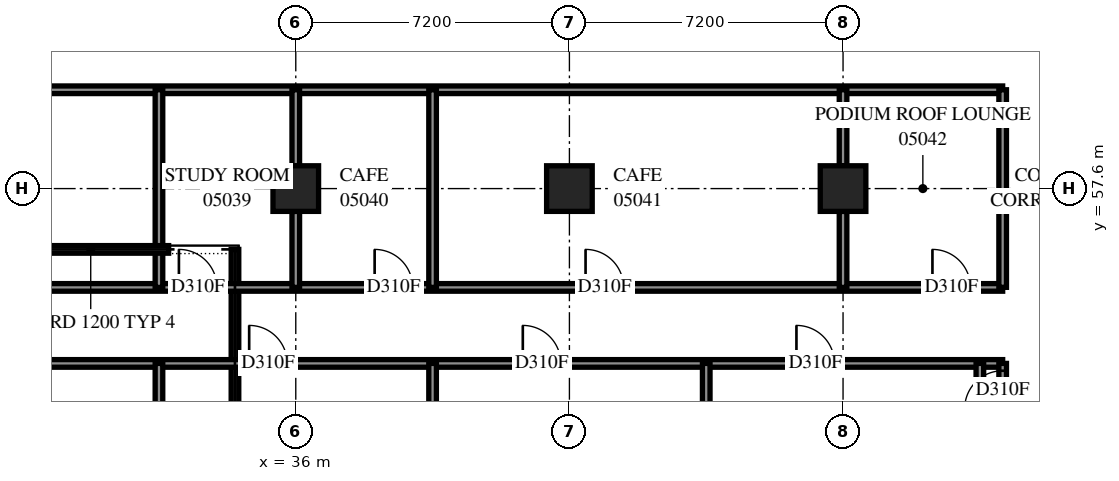
"""IFC4 building model, lengths in metres.
Left out: names, types, materials, properties, quantities, classifications, styles, units other than length and angle.
Written with IfcOpenShell. Run it as: python <this file> out.ifc"""

import sys

from ifc_helpers import new_model, si_unit, direction, frame, frame_2d, origin, origin_2d, place, context, subcontext, project, spatial, polyline, rectangle, outline, extrude, element, fill, save


model = new_model("IFC4")
c1 = context("Model", 3, precision=1e-05, world=origin(), true_north=direction((0.0, 1.0)))
c2 = subcontext(c1, "Body", "Model", "MODEL_VIEW")
j1 = project(units=[si_unit("LENGTHUNIT", "METRE"), si_unit("PLANEANGLEUNIT", "RADIAN")], contexts=[c1])
p1 = place(None, origin())
s1 = spatial("IfcSite", under=j1, at=p1, CompositionType="ELEMENT")
p2 = place(p1, origin())
s2 = spatial("IfcBuilding", under=s1, at=p2, CompositionType="ELEMENT")
p3 = place(p2, frame((0.0, 0.0, 22.8)))
s3 = spatial("IfcBuildingStorey", under=s2, at=p3, CompositionType="ELEMENT", Elevation=22.8)
for number, where, z_axis, x_axis in (
    (1, (36.0, 57.6, 0.0), (0.0, 0.0, 1.0), (1.0, 0.0, 0.0)),
    (2, (43.2, 57.6, 0.0), (0.0, 0.0, 1.0), (1.0, 0.0, 0.0)),
    (3, (50.4, 57.6, 0.0), (0.0, 0.0, 1.0), (1.0, 0.0, 0.0)),
):
    element("IfcColumn", number, at=place(p3, frame(where, z_axis=z_axis, x_axis=x_axis)), inside=s3, PredefinedType="COLUMN", context=c2, shape_type="SweptSolid", body=[
        extrude(rectangle(XDim=1.2, YDim=1.2, at=origin_2d()), origin(), (0.0, 0.0, 1.0), 3.9),
    ])
p4 = place(p3, frame((34.4, 47.9, 0.0), z_axis=(0.0, 0.0, 1.0), x_axis=(0.0, 1.0, 0.0)))
e4 = element("IfcWall", 4, at=p4, inside=s3, PredefinedType="PARAPET", context=c2, shape_type="SweptSolid", body=[
    extrude(outline(polyline([(0.1, -0.1), (8.2, -0.1), (8.0, 0.1), (-0.1, 0.1), (0.1, -0.1)])), origin(), (0.0, 0.0, 1.0), 0.25),
])
p5 = place(p3, frame((0.0, 55.0, 0.0), z_axis=(0.0, 0.0, 1.0), x_axis=(1.0, 0.0, 0.0)))
e5 = element("IfcWall", 5, at=p5, inside=s3, PredefinedType="PARTITIONING", context=c2, shape_type="SweptSolid", body=[
    extrude(rectangle(XDim=54.6, YDim=0.2, at=frame_2d((27.3, 0.0))), origin(), (0.0, 0.0, 1.0), 3.9),
])
p6 = place(p5, frame((8.689, 0.0, 0.0)))
e6 = element("IfcOpeningElement", 6, at=p6, cuts=e5, PredefinedType="OPENING", context=c2, shape_type="SweptSolid", body=[
    extrude(rectangle(XDim=1.0, YDim=2.1, at=frame_2d((0.5, 1.05))), frame((0.0, 0.11, 0.0), z_axis=(0.0, -1.0, 0.0), x_axis=(1.0, 0.0, 0.0)), (0.0, 0.0, 1.0), 0.22),
])
p7 = place(p5, frame((14.825, 0.0, 0.0)))
e7 = element("IfcOpeningElement", 7, at=p7, cuts=e5, PredefinedType="OPENING", context=c2, shape_type="SweptSolid", body=[
    extrude(rectangle(XDim=1.0, YDim=2.1, at=frame_2d((0.5, 1.05))), frame((0.0, 0.11, 0.0), z_axis=(0.0, -1.0, 0.0), x_axis=(1.0, 0.0, 0.0)), (0.0, 0.0, 1.0), 0.22),
])
p8 = place(p5, frame((27.284, 0.0, 0.0)))
e8 = element("IfcOpeningElement", 8, at=p8, cuts=e5, PredefinedType="OPENING", context=c2, shape_type="SweptSolid", body=[
    extrude(rectangle(XDim=1.0, YDim=2.1, at=frame_2d((0.5, 1.05))), frame((0.0, 0.11, 0.0), z_axis=(0.0, -1.0, 0.0), x_axis=(1.0, 0.0, 0.0)), (0.0, 0.0, 1.0), 0.22),
])
p9 = place(p5, frame((32.925, 0.0, 0.0)))
e9 = element("IfcOpeningElement", 9, at=p9, cuts=e5, PredefinedType="OPENING", context=c2, shape_type="SweptSolid", body=[
    extrude(rectangle(XDim=1.0, YDim=2.1, at=frame_2d((0.5, 1.05))), frame((0.0, 0.11, 0.0), z_axis=(0.0, -1.0, 0.0), x_axis=(1.0, 0.0, 0.0)), (0.0, 0.0, 1.0), 0.22),
])
p10 = place(p5, frame((38.075, 0.0, 0.0)))
e10 = element("IfcOpeningElement", 10, at=p10, cuts=e5, PredefinedType="OPENING", context=c2, shape_type="SweptSolid", body=[
    extrude(rectangle(XDim=1.0, YDim=2.1, at=frame_2d((0.5, 1.05))), frame((0.0, 0.11, 0.0), z_axis=(0.0, -1.0, 0.0), x_axis=(1.0, 0.0, 0.0)), (0.0, 0.0, 1.0), 0.22),
])
p11 = place(p5, frame((43.625, 0.0, 0.0)))
e11 = element("IfcOpeningElement", 11, at=p11, cuts=e5, PredefinedType="OPENING", context=c2, shape_type="SweptSolid", body=[
    extrude(rectangle(XDim=1.0, YDim=2.1, at=frame_2d((0.5, 1.05))), frame((0.0, 0.11, 0.0), z_axis=(0.0, -1.0, 0.0), x_axis=(1.0, 0.0, 0.0)), (0.0, 0.0, 1.0), 0.22),
])
p12 = place(p5, frame((52.752, 0.0, 0.0)))
e12 = element("IfcOpeningElement", 12, at=p12, cuts=e5, PredefinedType="OPENING", context=c2, shape_type="SweptSolid", body=[
    extrude(rectangle(XDim=1.0, YDim=2.1, at=frame_2d((0.5, 1.05))), frame((0.0, 0.11, 0.0), z_axis=(0.0, -1.0, 0.0), x_axis=(1.0, 0.0, 0.0)), (0.0, 0.0, 1.0), 0.22),
])
p13 = place(p5, frame((2.332, 0.0, 0.0)))
e13 = element("IfcOpeningElement", 13, at=p13, cuts=e5, PredefinedType="OPENING", context=c2, shape_type="SweptSolid", body=[
    extrude(rectangle(XDim=1.0, YDim=2.1, at=frame_2d((0.5, 1.05))), frame((0.0, 0.11, 0.0), z_axis=(0.0, -1.0, 0.0), x_axis=(1.0, 0.0, 0.0)), (0.0, 0.0, 1.0), 0.22),
])
p14 = place(p3, frame((0.0, 53.0, 0.0), z_axis=(0.0, 0.0, 1.0), x_axis=(1.0, 0.0, 0.0)))
e14 = element("IfcWall", 14, at=p14, inside=s3, PredefinedType="PARTITIONING", context=c2, shape_type="SweptSolid", body=[
    extrude(rectangle(XDim=54.6, YDim=0.2, at=frame_2d((27.3, 0.0))), origin(), (0.0, 0.0, 1.0), 3.9),
])
p15 = place(p14, frame((8.689, 0.0, 0.0)))
e15 = element("IfcOpeningElement", 15, at=p15, cuts=e14, PredefinedType="OPENING", context=c2, shape_type="SweptSolid", body=[
    extrude(rectangle(XDim=1.0, YDim=2.1, at=frame_2d((0.5, 1.05))), frame((0.0, 0.11, 0.0), z_axis=(0.0, -1.0, 0.0), x_axis=(1.0, 0.0, 0.0)), (0.0, 0.0, 1.0), 0.22),
])
p16 = place(p14, frame((13.174, 0.0, 0.0)))
e16 = element("IfcOpeningElement", 16, at=p16, cuts=e14, PredefinedType="OPENING", context=c2, shape_type="SweptSolid", body=[
    extrude(rectangle(XDim=1.0, YDim=2.1, at=frame_2d((0.5, 1.05))), frame((0.0, 0.11, 0.0), z_axis=(0.0, -1.0, 0.0), x_axis=(1.0, 0.0, 0.0)), (0.0, 0.0, 1.0), 0.22),
])
p17 = place(p14, frame((20.374, 0.0, 0.0)))
e17 = element("IfcOpeningElement", 17, at=p17, cuts=e14, PredefinedType="OPENING", context=c2, shape_type="SweptSolid", body=[
    extrude(rectangle(XDim=1.0, YDim=2.1, at=frame_2d((0.5, 1.05))), frame((0.0, 0.11, 0.0), z_axis=(0.0, -1.0, 0.0), x_axis=(1.0, 0.0, 0.0)), (0.0, 0.0, 1.0), 0.22),
])
p18 = place(p14, frame((27.574, 0.0, 0.0)))
e18 = element("IfcOpeningElement", 18, at=p18, cuts=e14, PredefinedType="OPENING", context=c2, shape_type="SweptSolid", body=[
    extrude(rectangle(XDim=1.0, YDim=2.1, at=frame_2d((0.5, 1.05))), frame((0.0, 0.11, 0.0), z_axis=(0.0, -1.0, 0.0), x_axis=(1.0, 0.0, 0.0)), (0.0, 0.0, 1.0), 0.22),
])
p19 = place(p14, frame((34.774, 0.0, 0.0)))
e19 = element("IfcOpeningElement", 19, at=p19, cuts=e14, PredefinedType="OPENING", context=c2, shape_type="SweptSolid", body=[
    extrude(rectangle(XDim=1.0, YDim=2.1, at=frame_2d((0.5, 1.05))), frame((0.0, 0.11, 0.0), z_axis=(0.0, -1.0, 0.0), x_axis=(1.0, 0.0, 0.0)), (0.0, 0.0, 1.0), 0.22),
])
p20 = place(p14, frame((41.974, 0.0, 0.0)))
e20 = element("IfcOpeningElement", 20, at=p20, cuts=e14, PredefinedType="OPENING", context=c2, shape_type="SweptSolid", body=[
    extrude(rectangle(XDim=1.0, YDim=2.1, at=frame_2d((0.5, 1.05))), frame((0.0, 0.11, 0.0), z_axis=(0.0, -1.0, 0.0), x_axis=(1.0, 0.0, 0.0)), (0.0, 0.0, 1.0), 0.22),
])
p21 = place(p14, frame((49.174, 0.0, 0.0)))
e21 = element("IfcOpeningElement", 21, at=p21, cuts=e14, PredefinedType="OPENING", context=c2, shape_type="SweptSolid", body=[
    extrude(rectangle(XDim=1.0, YDim=2.1, at=frame_2d((0.5, 1.05))), frame((0.0, 0.11, 0.0), z_axis=(0.0, -1.0, 0.0), x_axis=(1.0, 0.0, 0.0)), (0.0, 0.0, 1.0), 0.22),
])
p22 = place(p14, frame((2.406, 0.0, 0.0)))
e22 = element("IfcOpeningElement", 22, at=p22, cuts=e14, PredefinedType="OPENING", context=c2, shape_type="SweptSolid", body=[
    extrude(rectangle(XDim=1.0, YDim=2.1, at=frame_2d((0.5, 1.05))), frame((0.0, 0.11, 0.0), z_axis=(0.0, -1.0, 0.0), x_axis=(1.0, 0.0, 0.0)), (0.0, 0.0, 1.0), 0.22),
])
p23 = place(p14, frame((4.748, 0.0, 0.0)))
e23 = element("IfcOpeningElement", 23, at=p23, cuts=e14, PredefinedType="OPENING", context=c2, shape_type="SweptSolid", body=[
    extrude(rectangle(XDim=1.0, YDim=2.1, at=frame_2d((0.5, 1.05))), frame((0.0, 0.11, 0.0), z_axis=(0.0, -1.0, 0.0), x_axis=(1.0, 0.0, 0.0)), (0.0, 0.0, 1.0), 0.22),
])
p24 = place(p3, frame((0.002, 60.2, 0.0), z_axis=(0.0, 0.0, 1.0), x_axis=(1.0, 0.0, 0.0)))
e24 = element("IfcWall", 24, at=p24, inside=s3, PredefinedType="PARTITIONING", context=c2, shape_type="SweptSolid", body=[
    extrude(rectangle(XDim=54.598, YDim=0.2, at=frame_2d((27.299, 0.0))), origin(), (0.0, 0.0, 1.0), 3.9),
])
p25 = place(p24, frame((3.863, 0.0, 0.0)))
e25 = element("IfcOpeningElement", 25, at=p25, cuts=e24, PredefinedType="OPENING", context=c2, shape_type="SweptSolid", body=[
    extrude(rectangle(XDim=1.0, YDim=2.1, at=frame_2d((0.5, 1.05))), frame((0.0, 0.11, 0.0), z_axis=(0.0, -1.0, 0.0), x_axis=(1.0, 0.0, 0.0)), (0.0, 0.0, 1.0), 0.22),
])
for number, where, z_axis, x_axis in (
    (26, (32.4, 42.55, 0.0), (0.0, 0.0, 1.0), (0.0, 1.0, 0.0)),
    (27, (39.6, 42.55, 0.0), (0.0, 0.0, 1.0), (0.0, 1.0, 0.0)),
    (28, (46.8, 42.55, 0.0), (0.0, 0.0, 1.0), (0.0, 1.0, 0.0)),
    (29, (54.0, 42.55, 0.0), (0.0, 0.0, 1.0), (0.0, 1.0, 0.0)),
):
    element("IfcWall", number, at=place(p3, frame(where, z_axis=z_axis, x_axis=x_axis)), inside=s3, PredefinedType="PARTITIONING", context=c2, shape_type="SweptSolid", body=[
        extrude(rectangle(XDim=10.45, YDim=0.2, at=frame_2d((5.225, 0.0))), origin(), (0.0, 0.0, 1.0), 3.9),
    ])
p26 = place(p3, frame((54.6, 47.4, 0.0), z_axis=(0.0, 0.0, 1.0), x_axis=(0.0, 1.0, 0.0)))
e30 = element("IfcWall", 30, at=p26, inside=s3, PredefinedType="PARTITIONING", context=c2, shape_type="SweptSolid", body=[
    extrude(rectangle(XDim=5.6, YDim=0.2, at=frame_2d((2.8, 0.0))), origin(), (0.0, 0.0, 1.0), 3.9),
])
p27 = place(p26, frame((4.407, 0.0, 0.0)))
e31 = element("IfcOpeningElement", 31, at=p27, cuts=e30, PredefinedType="OPENING", context=c2, shape_type="SweptSolid", body=[
    extrude(rectangle(XDim=1.0, YDim=2.1, at=frame_2d((0.5, 1.05))), frame((0.0, 0.11, 0.0), z_axis=(0.0, -1.0, 0.0), x_axis=(1.0, 0.0, 0.0)), (0.0, 0.0, 1.0), 0.22),
])
for number, where, z_axis, x_axis in (
    (32, (32.4, 55.0, 0.0), (0.0, 0.0, 1.0), (0.0, 1.0, 0.0)),
    (33, (39.6, 55.0, 0.0), (0.0, 0.0, 1.0), (0.0, 1.0, 0.0)),
):
    element("IfcWall", number, at=place(p3, frame(where, z_axis=z_axis, x_axis=x_axis)), inside=s3, PredefinedType="PARTITIONING", context=c2, shape_type="SweptSolid", body=[
        extrude(rectangle(XDim=5.2, YDim=0.2, at=frame_2d((2.6, 0.0))), origin(), (0.0, 0.0, 1.0), 3.9),
    ])
p28 = place(p3, frame((54.6, 55.002, 0.0), z_axis=(0.0, 0.0, 1.0), x_axis=(0.0, 1.0, 0.0)))
e34 = element("IfcWall", 34, at=p28, inside=s3, PredefinedType="PARTITIONING", context=c2, shape_type="SweptSolid", body=[
    extrude(rectangle(XDim=5.198, YDim=0.2, at=frame_2d((2.599, 0.0))), origin(), (0.0, 0.0, 1.0), 3.9),
])
p29 = place(p3, frame((36.0, 55.0, 0.0), z_axis=(0.0, 0.0, 1.0), x_axis=(0.0, 1.0, 0.0)))
e35 = element("IfcWall", 35, at=p29, inside=s3, PredefinedType="PARTITIONING", context=c2, shape_type="SweptSolid", body=[
    extrude(rectangle(XDim=2.0, YDim=0.2, at=frame_2d((1.0, 0.0))), origin(), (0.0, 0.0, 1.0), 3.4),
])
for number, where, z_axis, x_axis in (
    (36, (36.0, 58.2, 0.0), (0.0, 0.0, 1.0), (0.0, 1.0, 0.0)),
    (37, (50.4, 55.0, 0.0), (0.0, 0.0, 1.0), (0.0, 1.0, 0.0)),
    (38, (50.4, 58.2, 0.0), (0.0, 0.0, 1.0), (0.0, 1.0, 0.0)),
):
    element("IfcWall", number, at=place(p3, frame(where, z_axis=z_axis, x_axis=x_axis)), inside=s3, PredefinedType="PARTITIONING", context=c2, shape_type="SweptSolid", body=[
        extrude(rectangle(XDim=2.0, YDim=0.2, at=frame_2d((1.0, 0.0))), origin(), (0.0, 0.0, 1.0), 3.9),
    ])
p30 = place(p3, frame((32.655, 56.0, 0.0), z_axis=(0.0, 0.0, 1.0), x_axis=(-1.0, 0.0, 0.0)))
e39 = element("IfcWall", 39, at=p30, inside=s3, PredefinedType="PARAPET", context=c2, shape_type="SweptSolid", body=[
    extrude(outline(polyline([(0.0, -0.1), (4.101, -0.1), (4.101, 0.1), (0.0, 0.1), (0.0, -0.1)])), origin(), (0.0, 0.0, 1.0), 0.25),
])
p31 = place(p19, origin())
e40 = element("IfcDoor", 40, at=p31, inside=s3, OperationType="SINGLE_SWING_RIGHT", PredefinedType="DOOR", context=c2, shape_type="SweptSolid", body=[
    extrude(rectangle(XDim=1.0, YDim=2.1, at=frame_2d((0.5, 1.05))), frame((0.0, 0.025, 0.0), z_axis=(0.0, -1.0, 0.0), x_axis=(1.0, 0.0, 0.0)), (0.0, 0.0, 1.0), 0.05),
])
fill(e19, e40)
p32 = place(p20, origin())
e41 = element("IfcDoor", 41, at=p32, inside=s3, OperationType="SINGLE_SWING_RIGHT", PredefinedType="DOOR", context=c2, shape_type="SweptSolid", body=[
    extrude(rectangle(XDim=1.0, YDim=2.1, at=frame_2d((0.5, 1.05))), frame((0.0, 0.025, 0.0), z_axis=(0.0, -1.0, 0.0), x_axis=(1.0, 0.0, 0.0)), (0.0, 0.0, 1.0), 0.05),
])
fill(e20, e41)
p33 = place(p21, origin())
e42 = element("IfcDoor", 42, at=p33, inside=s3, OperationType="SINGLE_SWING_RIGHT", PredefinedType="DOOR", context=c2, shape_type="SweptSolid", body=[
    extrude(rectangle(XDim=1.0, YDim=2.1, at=frame_2d((0.5, 1.05))), frame((0.0, 0.025, 0.0), z_axis=(0.0, -1.0, 0.0), x_axis=(1.0, 0.0, 0.0)), (0.0, 0.0, 1.0), 0.05),
])
fill(e21, e42)
p34 = place(p27, origin())
e43 = element("IfcDoor", 43, at=p34, inside=s3, OperationType="SINGLE_SWING_RIGHT", PredefinedType="DOOR", context=c2, shape_type="SweptSolid", body=[
    extrude(rectangle(XDim=1.0, YDim=2.1, at=frame_2d((0.5, 1.05))), frame((0.0, 0.025, 0.0), z_axis=(0.0, -1.0, 0.0), x_axis=(1.0, 0.0, 0.0)), (0.0, 0.0, 1.0), 0.05),
])
fill(e31, e43)
p35 = place(p9, origin())
e44 = element("IfcDoor", 44, at=p35, inside=s3, OperationType="SINGLE_SWING_LEFT", PredefinedType="DOOR", context=c2, shape_type="SweptSolid", body=[
    extrude(rectangle(XDim=1.0, YDim=2.1, at=frame_2d((0.5, 1.05))), frame((0.0, 0.025, 0.0), z_axis=(0.0, -1.0, 0.0), x_axis=(1.0, 0.0, 0.0)), (0.0, 0.0, 1.0), 0.05),
])
fill(e9, e44)
p36 = place(p10, origin())
e45 = element("IfcDoor", 45, at=p36, inside=s3, OperationType="SINGLE_SWING_RIGHT", PredefinedType="DOOR", context=c2, shape_type="SweptSolid", body=[
    extrude(rectangle(XDim=1.0, YDim=2.1, at=frame_2d((0.5, 1.05))), frame((0.0, 0.025, 0.0), z_axis=(0.0, -1.0, 0.0), x_axis=(1.0, 0.0, 0.0)), (0.0, 0.0, 1.0), 0.05),
])
fill(e10, e45)
p37 = place(p11, origin())
e46 = element("IfcDoor", 46, at=p37, inside=s3, OperationType="SINGLE_SWING_LEFT", PredefinedType="DOOR", context=c2, shape_type="SweptSolid", body=[
    extrude(rectangle(XDim=1.0, YDim=2.1, at=frame_2d((0.5, 1.05))), frame((0.0, 0.025, 0.0), z_axis=(0.0, -1.0, 0.0), x_axis=(1.0, 0.0, 0.0)), (0.0, 0.0, 1.0), 0.05),
])
fill(e11, e46)
p38 = place(p12, origin())
e47 = element("IfcDoor", 47, at=p38, inside=s3, OperationType="SINGLE_SWING_RIGHT", PredefinedType="DOOR", context=c2, shape_type="SweptSolid", body=[
    extrude(rectangle(XDim=1.0, YDim=2.1, at=frame_2d((0.5, 1.05))), frame((0.0, 0.025, 0.0), z_axis=(0.0, -1.0, 0.0), x_axis=(1.0, 0.0, 0.0)), (0.0, 0.0, 1.0), 0.05),
])
fill(e12, e47)
save(model, sys.argv[1])
